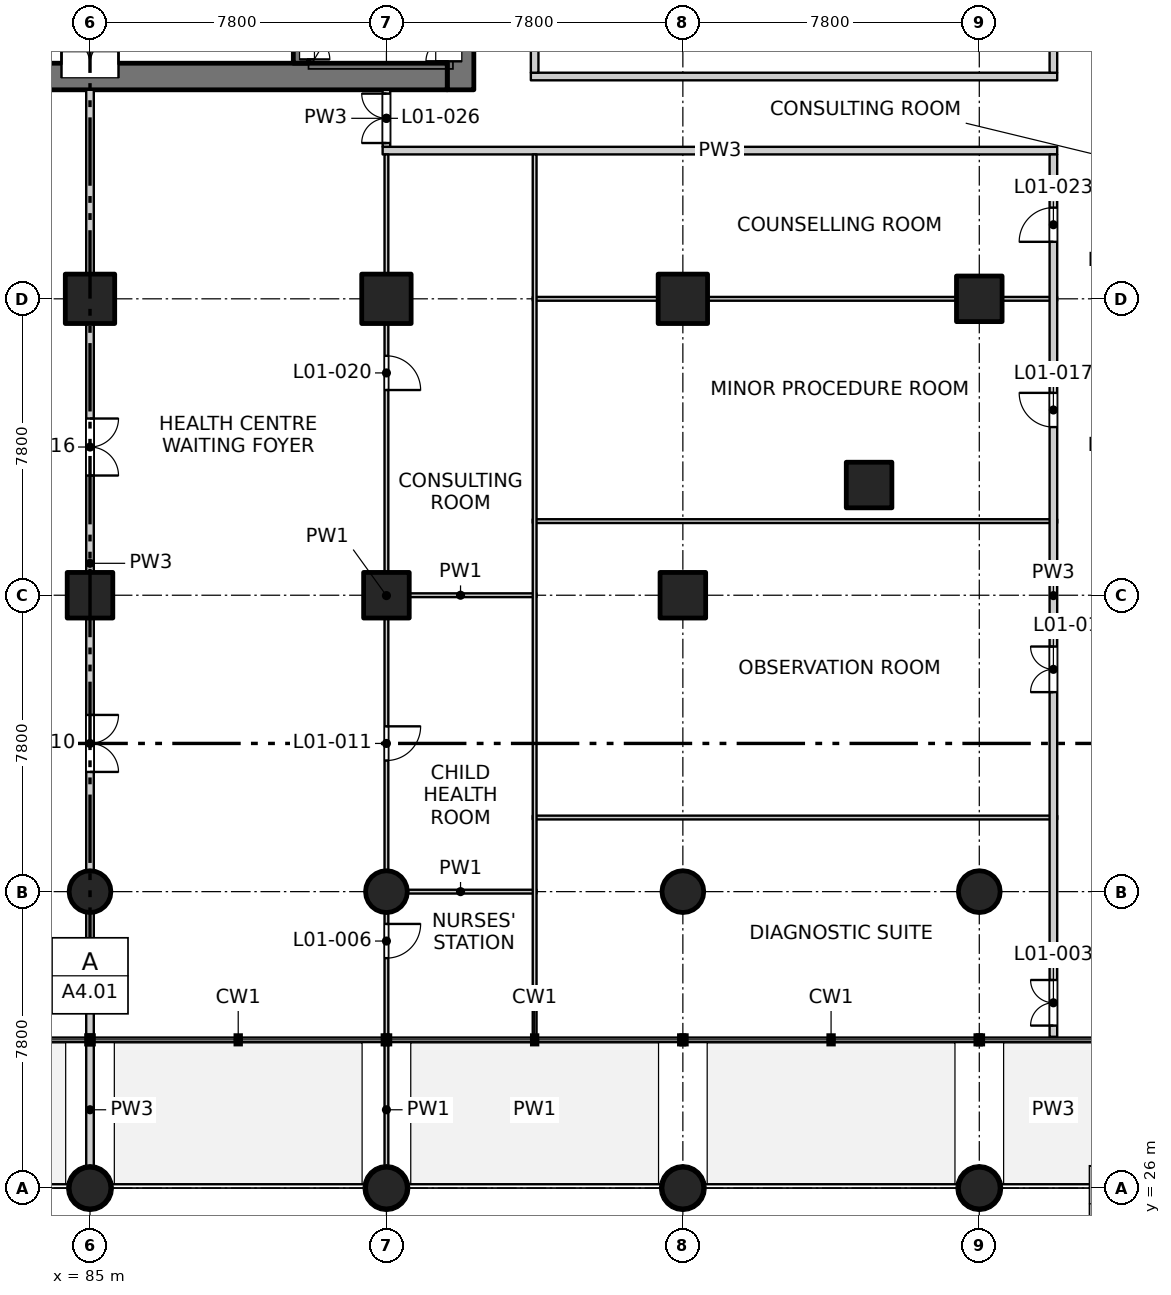
"""IFC4 building model, lengths in metres.
Left out: names, types, materials, properties, quantities, classifications, styles, units other than length and angle.
Written with IfcOpenShell. Run it as: python <this file> out.ifc"""

import sys

from ifc_helpers import new_model, si_unit, direction, frame, frame_2d, origin, origin_2d, place, context, subcontext, project, spatial, rectangle, circle, extrude, element, fill, save


model = new_model("IFC4")
c1 = context("Model", 3, precision=1e-05, world=origin(), true_north=direction((0.0, 1.0)))
c2 = subcontext(c1, "Body", "Model", "MODEL_VIEW")
j1 = project(units=[si_unit("LENGTHUNIT", "METRE"), si_unit("PLANEANGLEUNIT", "RADIAN")], contexts=[c1])
p1 = place(None, origin())
s1 = spatial("IfcSite", under=j1, at=p1, CompositionType="ELEMENT")
p2 = place(p1, origin())
s2 = spatial("IfcBuilding", under=s1, at=p2, CompositionType="ELEMENT")
p3 = place(p2, frame((0.0, 0.0, 6.0)))
s3 = spatial("IfcBuildingStorey", under=s2, at=p3, CompositionType="ELEMENT", Elevation=6.0)
for number, where, z_axis, x_axis in (
    (1, (105.5, 44.5, -0.3), (0.0, 0.0, 1.0), (1.0, 0.0, 0.0)),
    (2, (108.4, 49.4, -0.3), (0.0, 0.0, 1.0), (1.0, 0.0, 0.0)),
    (3, (85.0, 41.6, -0.3), (0.0, 0.0, 1.0), (1.0, 0.0, 0.0)),
    (4, (92.8, 41.6, -0.3), (0.0, 0.0, 1.0), (1.0, 0.0, 0.0)),
    (5, (100.6, 41.6, -0.3), (0.0, 0.0, 1.0), (1.0, 0.0, 0.0)),
):
    element("IfcColumn", number, at=place(p3, frame(where, z_axis=z_axis, x_axis=x_axis)), inside=s3, PredefinedType="COLUMN", context=c2, shape_type="SweptSolid", body=[
        extrude(rectangle(XDim=1.2, YDim=1.2, at=origin_2d()), origin(), (0.0, 0.0, 1.0), 4.5),
    ])
for number, where, z_axis, x_axis in (
    (6, (85.0, 49.4, -0.3), (0.0, 0.0, 1.0), (1.0, 0.0, 0.0)),
    (7, (92.8, 49.4, -0.3), (0.0, 0.0, 1.0), (1.0, 0.0, 0.0)),
    (8, (100.6, 49.4, -0.3), (0.0, 0.0, 1.0), (1.0, 0.0, 0.0)),
):
    element("IfcColumn", number, at=place(p3, frame(where, z_axis=z_axis, x_axis=x_axis)), inside=s3, PredefinedType="COLUMN", context=c2, shape_type="SweptSolid", body=[
        extrude(rectangle(XDim=1.3, YDim=1.3, at=origin_2d()), origin(), (0.0, 0.0, 1.0), 4.5),
    ])
for number, where, z_axis, x_axis in (
    (9, (85.0, 26.0, -0.3), (0.0, 0.0, 1.0), (1.0, 0.0, 0.0)),
    (10, (85.0, 33.8, -0.3), (0.0, 0.0, 1.0), (1.0, 0.0, 0.0)),
    (11, (92.8, 26.0, -0.3), (0.0, 0.0, 1.0), (1.0, 0.0, 0.0)),
    (12, (92.8, 33.8, -0.3), (0.0, 0.0, 1.0), (1.0, 0.0, 0.0)),
    (13, (100.6, 26.0, -0.3), (0.0, 0.0, 1.0), (1.0, 0.0, 0.0)),
    (14, (100.6, 33.8, -0.3), (0.0, 0.0, 1.0), (1.0, 0.0, 0.0)),
    (15, (108.4, 26.0, -0.3), (0.0, 0.0, 1.0), (1.0, 0.0, 0.0)),
    (16, (108.4, 33.8, -0.3), (0.0, 0.0, 1.0), (1.0, 0.0, 0.0)),
):
    element("IfcColumn", number, at=place(p3, frame(where, z_axis=z_axis, x_axis=x_axis)), inside=s3, PredefinedType="COLUMN", context=c2, shape_type="SweptSolid", body=[
        extrude(circle(Radius=0.55, at=origin_2d()), origin(), (0.0, 0.0, 1.0), 4.5),
    ])
p4 = place(p3, frame((94.75, 54.9, -0.3), z_axis=(0.0, 0.0, 1.0), x_axis=(0.0, 1.0, 0.0)))
e17 = element("IfcWall", 17, at=p4, inside=s3, PredefinedType="SOLIDWALL", context=c2, shape_type="SweptSolid", body=[
    extrude(rectangle(XDim=7.05, YDim=0.7, at=frame_2d((3.525, 0.0))), origin(), (0.0, 0.0, 1.0), 4.5),
])
p5 = place(p4, frame((0.75, 0.0, 0.3)))
e18 = element("IfcOpeningElement", 18, at=p5, cuts=e17, PredefinedType="OPENING", context=c2, shape_type="SweptSolid", body=[
    extrude(rectangle(XDim=1.2, YDim=2.1, at=frame_2d((0.6, 1.05))), frame((0.0, 0.36, 0.0), z_axis=(0.0, -1.0, 0.0), x_axis=(1.0, 0.0, 0.0)), (0.0, 0.0, 1.0), 0.72),
])
p6 = place(p3, frame((75.6, 55.25, -0.3), z_axis=(0.0, 0.0, 1.0), x_axis=(1.0, 0.0, 0.0)))
e19 = element("IfcWall", 19, at=p6, inside=s3, PredefinedType="SOLIDWALL", context=c2, shape_type="SweptSolid", body=[
    extrude(rectangle(XDim=18.8, YDim=0.7, at=frame_2d((9.4, 0.0))), origin(), (0.0, 0.0, 1.0), 4.5),
])
p7 = place(p6, frame((8.65, 0.0, 0.3)))
e20 = element("IfcOpeningElement", 20, at=p7, cuts=e19, PredefinedType="OPENING", context=c2, shape_type="SweptSolid", body=[
    extrude(rectangle(XDim=1.5, YDim=2.1, at=frame_2d((0.75, 1.05))), frame((0.0, 0.36, 0.0), z_axis=(0.0, -1.0, 0.0), x_axis=(1.0, 0.0, 0.0)), (0.0, 0.0, 1.0), 0.72),
])
p8 = place(p3, frame((90.55, 55.6, -0.3), z_axis=(0.0, 0.0, 1.0), x_axis=(0.0, 1.0, 0.0)))
e21 = element("IfcWall", 21, at=p8, inside=s3, PredefinedType="SOLIDWALL", context=c2, shape_type="SweptSolid", body=[
    extrude(rectangle(XDim=6.35, YDim=0.4, at=frame_2d((3.175, 0.0))), origin(), (0.0, 0.0, 1.0), 4.5),
])
p9 = place(p8, frame((0.1, 0.0, 0.3)))
e22 = element("IfcOpeningElement", 22, at=p9, cuts=e21, PredefinedType="OPENING", context=c2, shape_type="SweptSolid", body=[
    extrude(rectangle(XDim=1.2, YDim=2.1, at=frame_2d((0.6, 1.05))), frame((0.0, 0.21, 0.0), z_axis=(0.0, -1.0, 0.0), x_axis=(1.0, 0.0, 0.0)), (0.0, 0.0, 1.0), 0.42),
])
p10 = place(p3, frame((92.75, 33.8, 0.0), z_axis=(0.0, 0.0, 1.0), x_axis=(1.0, 0.0, 0.0)))
e23 = element("IfcWall", 23, at=p10, inside=s3, PredefinedType="PARTITIONING", context=c2, shape_type="SweptSolid", body=[
    extrude(rectangle(XDim=4.0, YDim=0.1, at=frame_2d((2.0, 0.0))), origin(), (0.0, 0.0, 1.0), 4.2),
])
p11 = place(p3, frame((96.65, 35.75, 0.0), z_axis=(0.0, 0.0, 1.0), x_axis=(1.0, 0.0, 0.0)))
e24 = element("IfcWall", 24, at=p11, inside=s3, PredefinedType="PARTITIONING", context=c2, shape_type="SweptSolid", body=[
    extrude(rectangle(XDim=13.8, YDim=0.1, at=frame_2d((6.9, 0.0))), origin(), (0.0, 0.0, 1.0), 4.2),
])
p12 = place(p3, frame((92.75, 41.6, 0.0), z_axis=(0.0, 0.0, 1.0), x_axis=(1.0, 0.0, 0.0)))
e25 = element("IfcWall", 25, at=p12, inside=s3, PredefinedType="PARTITIONING", context=c2, shape_type="SweptSolid", body=[
    extrude(rectangle(XDim=4.0, YDim=0.1, at=frame_2d((2.0, 0.0))), origin(), (0.0, 0.0, 1.0), 4.2),
])
for number, where, z_axis, x_axis in (
    (26, (96.65, 43.55, 0.0), (0.0, 0.0, 1.0), (1.0, 0.0, 0.0)),
    (27, (96.65, 49.4, 0.0), (0.0, 0.0, 1.0), (1.0, 0.0, 0.0)),
):
    element("IfcWall", number, at=place(p3, frame(where, z_axis=z_axis, x_axis=x_axis)), inside=s3, PredefinedType="PARTITIONING", context=c2, shape_type="SweptSolid", body=[
        extrude(rectangle(XDim=13.8, YDim=0.1, at=frame_2d((6.9, 0.0))), origin(), (0.0, 0.0, 1.0), 4.2),
    ])
p13 = place(p3, frame((92.7, 53.3, 0.0), z_axis=(0.0, 0.0, 1.0), x_axis=(1.0, 0.0, 0.0)))
e28 = element("IfcWall", 28, at=p13, inside=s3, PredefinedType="PARTITIONING", context=c2, shape_type="SweptSolid", body=[
    extrude(rectangle(XDim=17.75, YDim=0.2, at=frame_2d((8.875, 0.0))), origin(), (0.0, 0.0, 1.0), 4.2),
])
p14 = place(p3, frame((96.6, 55.25, 0.0), z_axis=(0.0, 0.0, 1.0), x_axis=(1.0, 0.0, 0.0)))
e29 = element("IfcWall", 29, at=p14, inside=s3, PredefinedType="PARTITIONING", context=c2, shape_type="SweptSolid", body=[
    extrude(rectangle(XDim=13.85, YDim=0.2, at=frame_2d((6.925, 0.0))), origin(), (0.0, 0.0, 1.0), 4.2),
])
p15 = place(p3, frame((85.0, 26.3, 0.0), z_axis=(0.0, 0.0, 1.0), x_axis=(0.0, 1.0, 0.0)))
e30 = element("IfcWall", 30, at=p15, inside=s3, PredefinedType="PARTITIONING", context=c2, shape_type="SweptSolid", body=[
    extrude(rectangle(XDim=3.52, YDim=0.2, at=frame_2d((1.76, 0.0))), origin(), (0.0, 0.0, 1.0), 4.2),
])
p16 = place(p3, frame((85.0, 29.98, 0.0), z_axis=(0.0, 0.0, 1.0), x_axis=(0.0, 1.0, 0.0)))
e31 = element("IfcWall", 31, at=p16, inside=s3, PredefinedType="PARTITIONING", context=c2, shape_type="SweptSolid", body=[
    extrude(rectangle(XDim=24.92, YDim=0.2, at=frame_2d((12.46, 0.0))), origin(), (0.0, 0.0, 1.0), 4.2),
])
p17 = place(p16, frame((6.97, 0.0, 0.0)))
e32 = element("IfcOpeningElement", 32, at=p17, cuts=e31, PredefinedType="OPENING", context=c2, shape_type="SweptSolid", body=[
    extrude(rectangle(XDim=1.5, YDim=2.1, at=frame_2d((0.75, 1.05))), frame((0.0, 0.11, 0.0), z_axis=(0.0, -1.0, 0.0), x_axis=(1.0, 0.0, 0.0)), (0.0, 0.0, 1.0), 0.22),
])
p18 = place(p16, frame((14.77, 0.0, 0.0)))
e33 = element("IfcOpeningElement", 33, at=p18, cuts=e31, PredefinedType="OPENING", context=c2, shape_type="SweptSolid", body=[
    extrude(rectangle(XDim=1.5, YDim=2.1, at=frame_2d((0.75, 1.05))), frame((0.0, 0.11, 0.0), z_axis=(0.0, -1.0, 0.0), x_axis=(1.0, 0.0, 0.0)), (0.0, 0.0, 1.0), 0.22),
])
p19 = place(p3, frame((92.8, 26.3, 0.0), z_axis=(0.0, 0.0, 1.0), x_axis=(0.0, 1.0, 0.0)))
e34 = element("IfcWall", 34, at=p19, inside=s3, PredefinedType="PARTITIONING", context=c2, shape_type="SweptSolid", body=[
    extrude(rectangle(XDim=3.52, YDim=0.1, at=frame_2d((1.76, 0.0))), origin(), (0.0, 0.0, 1.0), 4.2),
])
p20 = place(p3, frame((92.8, 29.98, 0.0), z_axis=(0.0, 0.0, 1.0), x_axis=(0.0, 1.0, 0.0)))
e35 = element("IfcWall", 35, at=p20, inside=s3, PredefinedType="PARTITIONING", context=c2, shape_type="SweptSolid", body=[
    extrude(rectangle(XDim=23.22, YDim=0.1, at=frame_2d((11.61, 0.0))), origin(), (0.0, 0.0, 1.0), 4.2),
])
p21 = place(p20, frame((2.07, 0.0, 0.0)))
e36 = element("IfcOpeningElement", 36, at=p21, cuts=e35, PredefinedType="OPENING", context=c2, shape_type="SweptSolid", body=[
    extrude(rectangle(XDim=0.9, YDim=2.1, at=frame_2d((0.45, 1.05))), frame((0.0, 0.06, 0.0), z_axis=(0.0, -1.0, 0.0), x_axis=(1.0, 0.0, 0.0)), (0.0, 0.0, 1.0), 0.12),
])
p22 = place(p20, frame((7.27, 0.0, 0.0)))
e37 = element("IfcOpeningElement", 37, at=p22, cuts=e35, PredefinedType="OPENING", context=c2, shape_type="SweptSolid", body=[
    extrude(rectangle(XDim=0.9, YDim=2.1, at=frame_2d((0.45, 1.05))), frame((0.0, 0.06, 0.0), z_axis=(0.0, -1.0, 0.0), x_axis=(1.0, 0.0, 0.0)), (0.0, 0.0, 1.0), 0.12),
])
p23 = place(p20, frame((17.02, 0.0, 0.0)))
e38 = element("IfcOpeningElement", 38, at=p23, cuts=e35, PredefinedType="OPENING", context=c2, shape_type="SweptSolid", body=[
    extrude(rectangle(XDim=0.9, YDim=2.1, at=frame_2d((0.45, 1.05))), frame((0.0, 0.06, 0.0), z_axis=(0.0, -1.0, 0.0), x_axis=(1.0, 0.0, 0.0)), (0.0, 0.0, 1.0), 0.12),
])
p24 = place(p3, frame((92.8, 53.4, 0.0), z_axis=(0.0, 0.0, 1.0), x_axis=(0.0, 1.0, 0.0)))
e39 = element("IfcWall", 39, at=p24, inside=s3, PredefinedType="PARTITIONING", context=c2, shape_type="SweptSolid", body=[
    extrude(rectangle(XDim=1.5, YDim=0.2, at=frame_2d((0.75, 0.0))), origin(), (0.0, 0.0, 1.0), 4.2),
])
p25 = place(p24, frame((0.1, 0.0, 0.0)))
e40 = element("IfcOpeningElement", 40, at=p25, cuts=e39, PredefinedType="OPENING", context=c2, shape_type="SweptSolid", body=[
    extrude(rectangle(XDim=1.3, YDim=2.1, at=frame_2d((0.65, 1.05))), frame((0.0, 0.11, 0.0), z_axis=(0.0, -1.0, 0.0), x_axis=(1.0, 0.0, 0.0)), (0.0, 0.0, 1.0), 0.22),
])
p26 = place(p3, frame((96.7, 26.3, 0.0), z_axis=(0.0, 0.0, 1.0), x_axis=(0.0, 1.0, 0.0)))
e41 = element("IfcWall", 41, at=p26, inside=s3, PredefinedType="PARTITIONING", context=c2, shape_type="SweptSolid", body=[
    extrude(rectangle(XDim=3.52, YDim=0.1, at=frame_2d((1.76, 0.0))), origin(), (0.0, 0.0, 1.0), 4.2),
])
p27 = place(p3, frame((96.7, 29.98, 0.0), z_axis=(0.0, 0.0, 1.0), x_axis=(0.0, 1.0, 0.0)))
e42 = element("IfcWall", 42, at=p27, inside=s3, PredefinedType="PARTITIONING", context=c2, shape_type="SweptSolid", body=[
    extrude(rectangle(XDim=23.22, YDim=0.1, at=frame_2d((11.61, 0.0))), origin(), (0.0, 0.0, 1.0), 4.2),
])
p28 = place(p3, frame((96.7, 55.35, 0.0), z_axis=(0.0, 0.0, 1.0), x_axis=(0.0, 1.0, 0.0)))
e43 = element("IfcWall", 43, at=p28, inside=s3, PredefinedType="PARTITIONING", context=c2, shape_type="SweptSolid", body=[
    extrude(rectangle(XDim=32.75, YDim=0.2, at=frame_2d((16.375, 0.0))), origin(), (0.0, 0.0, 1.0), 4.2),
])
p29 = place(p3, frame((110.35, 26.3, 0.0), z_axis=(0.0, 0.0, 1.0), x_axis=(0.0, 1.0, 0.0)))
e44 = element("IfcWall", 44, at=p29, inside=s3, PredefinedType="PARTITIONING", context=c2, shape_type="SweptSolid", body=[
    extrude(rectangle(XDim=3.52, YDim=0.2, at=frame_2d((1.76, 0.0))), origin(), (0.0, 0.0, 1.0), 4.2),
])
p30 = place(p3, frame((110.35, 29.98, 0.0), z_axis=(0.0, 0.0, 1.0), x_axis=(0.0, 1.0, 0.0)))
e45 = element("IfcWall", 45, at=p30, inside=s3, PredefinedType="PARTITIONING", context=c2, shape_type="SweptSolid", body=[
    extrude(rectangle(XDim=23.22, YDim=0.2, at=frame_2d((11.61, 0.0))), origin(), (0.0, 0.0, 1.0), 4.2),
])
p31 = place(p30, frame((0.295, 0.0, 0.0)))
e46 = element("IfcOpeningElement", 46, at=p31, cuts=e45, PredefinedType="OPENING", context=c2, shape_type="SweptSolid", body=[
    extrude(rectangle(XDim=1.2, YDim=2.1, at=frame_2d((0.6, 1.05))), frame((0.0, 0.11, 0.0), z_axis=(0.0, -1.0, 0.0), x_axis=(1.0, 0.0, 0.0)), (0.0, 0.0, 1.0), 0.22),
])
p32 = place(p30, frame((9.07, 0.0, 0.0)))
e47 = element("IfcOpeningElement", 47, at=p32, cuts=e45, PredefinedType="OPENING", context=c2, shape_type="SweptSolid", body=[
    extrude(rectangle(XDim=1.2, YDim=2.1, at=frame_2d((0.6, 1.05))), frame((0.0, 0.11, 0.0), z_axis=(0.0, -1.0, 0.0), x_axis=(1.0, 0.0, 0.0)), (0.0, 0.0, 1.0), 0.22),
])
p33 = place(p30, frame((16.045, 0.0, 0.0)))
e48 = element("IfcOpeningElement", 48, at=p33, cuts=e45, PredefinedType="OPENING", context=c2, shape_type="SweptSolid", body=[
    extrude(rectangle(XDim=0.9, YDim=2.1, at=frame_2d((0.45, 1.05))), frame((0.0, 0.11, 0.0), z_axis=(0.0, -1.0, 0.0), x_axis=(1.0, 0.0, 0.0)), (0.0, 0.0, 1.0), 0.22),
])
p34 = place(p30, frame((20.92, 0.0, 0.0)))
e49 = element("IfcOpeningElement", 49, at=p34, cuts=e45, PredefinedType="OPENING", context=c2, shape_type="SweptSolid", body=[
    extrude(rectangle(XDim=0.9, YDim=2.1, at=frame_2d((0.45, 1.05))), frame((0.0, 0.11, 0.0), z_axis=(0.0, -1.0, 0.0), x_axis=(1.0, 0.0, 0.0)), (0.0, 0.0, 1.0), 0.22),
])
p35 = place(p3, frame((110.35, 55.35, 0.0), z_axis=(0.0, 0.0, 1.0), x_axis=(0.0, 1.0, 0.0)))
e50 = element("IfcWall", 50, at=p35, inside=s3, PredefinedType="PARTITIONING", context=c2, shape_type="SweptSolid", body=[
    extrude(rectangle(XDim=32.75, YDim=0.2, at=frame_2d((16.375, 0.0))), origin(), (0.0, 0.0, 1.0), 4.2),
])
p36 = place(p35, frame((4.175, 0.0, 0.0)))
e51 = element("IfcOpeningElement", 51, at=p36, cuts=e50, PredefinedType="OPENING", context=c2, shape_type="SweptSolid", body=[
    extrude(rectangle(XDim=1.2, YDim=2.1, at=frame_2d((0.6, 1.05))), frame((0.0, 0.11, 0.0), z_axis=(0.0, -1.0, 0.0), x_axis=(1.0, 0.0, 0.0)), (0.0, 0.0, 1.0), 0.22),
])
p37 = place(p35, frame((12.95, 0.0, 0.0)))
e52 = element("IfcOpeningElement", 52, at=p37, cuts=e50, PredefinedType="OPENING", context=c2, shape_type="SweptSolid", body=[
    extrude(rectangle(XDim=1.2, YDim=2.1, at=frame_2d((0.6, 1.05))), frame((0.0, 0.11, 0.0), z_axis=(0.0, -1.0, 0.0), x_axis=(1.0, 0.0, 0.0)), (0.0, 0.0, 1.0), 0.22),
])
p38 = place(p35, frame((20.75, 0.0, 0.0)))
e53 = element("IfcOpeningElement", 53, at=p38, cuts=e50, PredefinedType="OPENING", context=c2, shape_type="SweptSolid", body=[
    extrude(rectangle(XDim=1.2, YDim=2.1, at=frame_2d((0.6, 1.05))), frame((0.0, 0.11, 0.0), z_axis=(0.0, -1.0, 0.0), x_axis=(1.0, 0.0, 0.0)), (0.0, 0.0, 1.0), 0.22),
])
p39 = place(p35, frame((28.55, 0.0, 0.0)))
e54 = element("IfcOpeningElement", 54, at=p39, cuts=e50, PredefinedType="OPENING", context=c2, shape_type="SweptSolid", body=[
    extrude(rectangle(XDim=1.2, YDim=2.1, at=frame_2d((0.6, 1.05))), frame((0.0, 0.11, 0.0), z_axis=(0.0, -1.0, 0.0), x_axis=(1.0, 0.0, 0.0)), (0.0, 0.0, 1.0), 0.22),
])
p40 = place(p31, origin())
e55 = element("IfcDoor", 55, at=p40, inside=s3, OperationType="DOUBLE_DOOR_SINGLE_SWING", PredefinedType="DOOR", context=c2, shape_type="SweptSolid", body=[
    extrude(rectangle(XDim=1.2, YDim=2.1, at=frame_2d((0.6, 1.05))), frame((0.0, 0.025, 0.0), z_axis=(0.0, -1.0, 0.0), x_axis=(1.0, 0.0, 0.0)), (0.0, 0.0, 1.0), 0.05),
])
fill(e46, e55)
p41 = place(p21, origin())
e56 = element("IfcDoor", 56, at=p41, inside=s3, OperationType="SINGLE_SWING_LEFT", PredefinedType="DOOR", context=c2, shape_type="SweptSolid", body=[
    extrude(rectangle(XDim=0.9, YDim=2.1, at=frame_2d((0.45, 1.05))), frame((0.0, 0.025, 0.0), z_axis=(0.0, -1.0, 0.0), x_axis=(1.0, 0.0, 0.0)), (0.0, 0.0, 1.0), 0.05),
])
fill(e36, e56)
p42 = place(p17, origin())
e57 = element("IfcDoor", 57, at=p42, inside=s3, OperationType="DOUBLE_DOOR_SINGLE_SWING", PredefinedType="DOOR", context=c2, shape_type="SweptSolid", body=[
    extrude(rectangle(XDim=1.5, YDim=2.1, at=frame_2d((0.75, 1.05))), frame((0.0, 0.025, 0.0), z_axis=(0.0, -1.0, 0.0), x_axis=(1.0, 0.0, 0.0)), (0.0, 0.0, 1.0), 0.05),
])
fill(e32, e57)
p43 = place(p22, origin())
e58 = element("IfcDoor", 58, at=p43, inside=s3, OperationType="SINGLE_SWING_LEFT", PredefinedType="DOOR", context=c2, shape_type="SweptSolid", body=[
    extrude(rectangle(XDim=0.9, YDim=2.1, at=frame_2d((0.45, 1.05))), frame((0.0, 0.025, 0.0), z_axis=(0.0, -1.0, 0.0), x_axis=(1.0, 0.0, 0.0)), (0.0, 0.0, 1.0), 0.05),
])
fill(e37, e58)
p44 = place(p32, origin())
e59 = element("IfcDoor", 59, at=p44, inside=s3, OperationType="DOUBLE_DOOR_SINGLE_SWING", PredefinedType="DOOR", context=c2, shape_type="SweptSolid", body=[
    extrude(rectangle(XDim=1.2, YDim=2.1, at=frame_2d((0.6, 1.05))), frame((0.0, 0.025, 0.0), z_axis=(0.0, -1.0, 0.0), x_axis=(1.0, 0.0, 0.0)), (0.0, 0.0, 1.0), 0.05),
])
fill(e47, e59)
p45 = place(p18, origin())
e60 = element("IfcDoor", 60, at=p45, inside=s3, OperationType="DOUBLE_DOOR_SINGLE_SWING", PredefinedType="DOOR", context=c2, shape_type="SweptSolid", body=[
    extrude(rectangle(XDim=1.5, YDim=2.1, at=frame_2d((0.75, 1.05))), frame((0.0, 0.025, 0.0), z_axis=(0.0, -1.0, 0.0), x_axis=(1.0, 0.0, 0.0)), (0.0, 0.0, 1.0), 0.05),
])
fill(e33, e60)
p46 = place(p33, origin())
e61 = element("IfcDoor", 61, at=p46, inside=s3, OperationType="SINGLE_SWING_RIGHT", PredefinedType="DOOR", context=c2, shape_type="SweptSolid", body=[
    extrude(rectangle(XDim=0.9, YDim=2.1, at=frame_2d((0.45, 1.05))), frame((0.0, 0.025, 0.0), z_axis=(0.0, -1.0, 0.0), x_axis=(1.0, 0.0, 0.0)), (0.0, 0.0, 1.0), 0.05),
])
fill(e48, e61)
p47 = place(p23, origin())
e62 = element("IfcDoor", 62, at=p47, inside=s3, OperationType="SINGLE_SWING_RIGHT", PredefinedType="DOOR", context=c2, shape_type="SweptSolid", body=[
    extrude(rectangle(XDim=0.9, YDim=2.1, at=frame_2d((0.45, 1.05))), frame((0.0, 0.025, 0.0), z_axis=(0.0, -1.0, 0.0), x_axis=(1.0, 0.0, 0.0)), (0.0, 0.0, 1.0), 0.05),
])
fill(e38, e62)
p48 = place(p34, origin())
e63 = element("IfcDoor", 63, at=p48, inside=s3, OperationType="SINGLE_SWING_LEFT", PredefinedType="DOOR", context=c2, shape_type="SweptSolid", body=[
    extrude(rectangle(XDim=0.9, YDim=2.1, at=frame_2d((0.45, 1.05))), frame((0.0, 0.025, 0.0), z_axis=(0.0, -1.0, 0.0), x_axis=(1.0, 0.0, 0.0)), (0.0, 0.0, 1.0), 0.05),
])
fill(e49, e63)
p49 = place(p25, origin())
e64 = element("IfcDoor", 64, at=p49, inside=s3, OperationType="DOUBLE_DOOR_SINGLE_SWING", PredefinedType="DOOR", context=c2, shape_type="SweptSolid", body=[
    extrude(rectangle(XDim=1.3, YDim=2.1, at=frame_2d((0.65, 1.05))), frame((0.0, 0.025, 0.0), z_axis=(0.0, -1.0, 0.0), x_axis=(1.0, 0.0, 0.0)), (0.0, 0.0, 1.0), 0.05),
])
fill(e40, e64)
p50 = place(p7, origin())
e65 = element("IfcDoor", 65, at=p50, inside=s3, OperationType="DOUBLE_DOOR_SINGLE_SWING", PredefinedType="DOOR", context=c2, shape_type="SweptSolid", body=[
    extrude(rectangle(XDim=1.5, YDim=2.1, at=frame_2d((0.75, 1.05))), frame((0.0, 0.335, 0.0), z_axis=(0.0, -1.0, 0.0), x_axis=(1.0, 0.0, 0.0)), (0.0, 0.0, 1.0), 0.05),
])
fill(e20, e65)
p51 = place(p9, origin())
e66 = element("IfcDoor", 66, at=p51, inside=s3, OperationType="DOUBLE_DOOR_SINGLE_SWING", PredefinedType="DOOR", context=c2, shape_type="SweptSolid", body=[
    extrude(rectangle(XDim=1.2, YDim=2.1, at=frame_2d((0.6, 1.05))), frame((0.0, -0.135, 0.0), z_axis=(0.0, -1.0, 0.0), x_axis=(1.0, 0.0, 0.0)), (0.0, 0.0, 1.0), 0.05),
])
fill(e22, e66)
p52 = place(p5, origin())
e67 = element("IfcDoor", 67, at=p52, inside=s3, OperationType="DOUBLE_DOOR_SINGLE_SWING", PredefinedType="DOOR", context=c2, shape_type="SweptSolid", body=[
    extrude(rectangle(XDim=1.2, YDim=2.1, at=frame_2d((0.6, 1.05))), frame((0.0, 0.335, 0.0), z_axis=(0.0, -1.0, 0.0), x_axis=(1.0, 0.0, 0.0)), (0.0, 0.0, 1.0), 0.05),
])
fill(e18, e67)
save(model, sys.argv[1])
